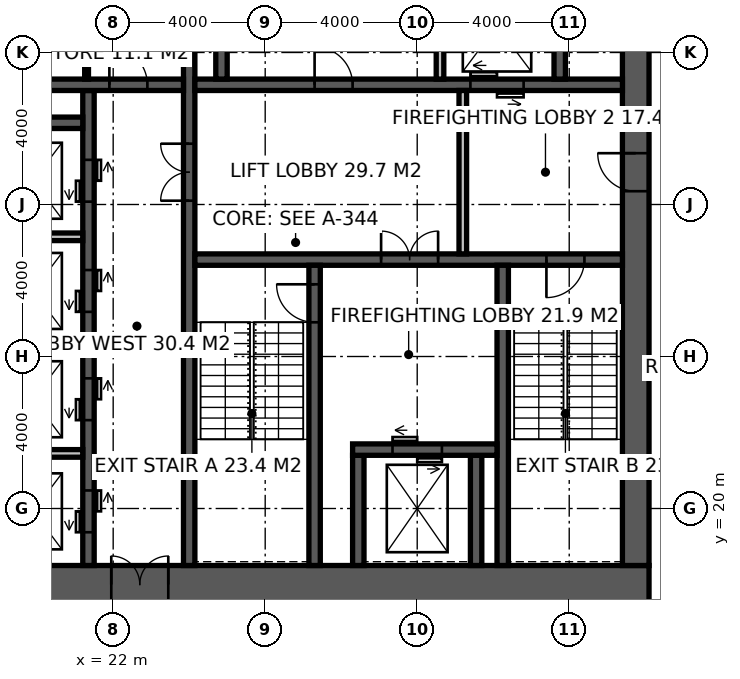
"""IFC4 building model, lengths in metres.
Left out: names, types, materials, properties, quantities, classifications, styles, units other than length and angle.
Written with IfcOpenShell. Run it as: python <this file> out.ifc"""

import sys

from ifc_helpers import new_model, si_unit, direction, frame, frame_2d, origin, place, context, subcontext, project, spatial, rectangle, extrude, element, fill, save


model = new_model("IFC4")
c1 = context("Model", 3, precision=1e-05, world=origin(), true_north=direction((0.0, 1.0)))
c2 = subcontext(c1, "Body", "Model", "MODEL_VIEW")
j1 = project(units=[si_unit("LENGTHUNIT", "METRE"), si_unit("PLANEANGLEUNIT", "RADIAN")], contexts=[c1])
p1 = place(None, origin())
s1 = spatial("IfcSite", under=j1, at=p1, CompositionType="ELEMENT")
p2 = place(p1, origin())
s2 = spatial("IfcBuilding", under=s1, at=p2, CompositionType="ELEMENT")
p3 = place(p2, frame((0.0, 0.0, 286.2)))
s3 = spatial("IfcBuildingStorey", under=s2, at=p3, CompositionType="ELEMENT", Elevation=286.2)
p4 = place(p3, frame((18.5, 18.0, -0.15), z_axis=(0.0, 0.0, 1.0), x_axis=(1.0, 0.0, 0.0)))
e1 = element("IfcWall", 1, at=p4, inside=s3, PredefinedType="SHEAR", context=c2, shape_type="SweptSolid", body=[
    extrude(rectangle(XDim=17.6, YDim=1.0, at=frame_2d((8.8, 0.0))), origin(), (0.0, 0.0, 1.0), 4.0),
])
p5 = place(p4, frame((3.45, 0.0, 0.15)))
e2 = element("IfcOpeningElement", 2, at=p5, cuts=e1, PredefinedType="OPENING", context=c2, shape_type="SweptSolid", body=[
    extrude(rectangle(XDim=1.5, YDim=2.4, at=frame_2d((0.75, 1.2))), frame((0.0, 0.51, 0.0), z_axis=(0.0, -1.0, 0.0), x_axis=(1.0, 0.0, 0.0)), (0.0, 0.0, 1.0), 1.02),
])
p6 = place(p3, frame((35.75, 18.5, -0.15), z_axis=(0.0, 0.0, 1.0), x_axis=(0.0, 1.0, 0.0)))
e3 = element("IfcWall", 3, at=p6, inside=s3, PredefinedType="SHEAR", context=c2, shape_type="SweptSolid", body=[
    extrude(rectangle(XDim=17.0, YDim=0.7, at=frame_2d((8.5, 0.0))), origin(), (0.0, 0.0, 1.0), 4.0),
])
p7 = place(p6, frame((9.85, 0.0, 0.15)))
e4 = element("IfcOpeningElement", 4, at=p7, cuts=e3, PredefinedType="OPENING", context=c2, shape_type="SweptSolid", body=[
    extrude(rectangle(XDim=1.0, YDim=2.2, at=frame_2d((0.5, 1.1))), frame((0.0, 0.36, 0.0), z_axis=(0.0, -1.0, 0.0), x_axis=(1.0, 0.0, 0.0)), (0.0, 0.0, 1.0), 0.72),
])
p8 = place(p3, frame((24.0, 18.5, -0.15), z_axis=(0.0, 0.0, 1.0), x_axis=(0.0, 1.0, 0.0)))
e5 = element("IfcWall", 5, at=p8, inside=s3, PredefinedType="SHEAR", context=c2, shape_type="SweptSolid", body=[
    extrude(rectangle(XDim=17.0, YDim=0.3, at=frame_2d((8.5, 0.0))), origin(), (0.0, 0.0, 1.0), 4.0),
])
p9 = place(p8, frame((9.6, 0.0, 0.15)))
e6 = element("IfcOpeningElement", 6, at=p9, cuts=e5, PredefinedType="OPENING", context=c2, shape_type="SweptSolid", body=[
    extrude(rectangle(XDim=1.5, YDim=2.4, at=frame_2d((0.75, 1.2))), frame((0.0, 0.16, 0.0), z_axis=(0.0, -1.0, 0.0), x_axis=(1.0, 0.0, 0.0)), (0.0, 0.0, 1.0), 0.32),
])
p10 = place(p3, frame((24.15, 26.55, -0.15), z_axis=(0.0, 0.0, 1.0), x_axis=(1.0, 0.0, 0.0)))
e7 = element("IfcWall", 7, at=p10, inside=s3, PredefinedType="SHEAR", context=c2, shape_type="SweptSolid", body=[
    extrude(rectangle(XDim=11.25, YDim=0.3, at=frame_2d((5.625, 0.0))), origin(), (0.0, 0.0, 1.0), 4.0),
])
p11 = place(p10, frame((9.25, 0.0, 0.15)))
e8 = element("IfcOpeningElement", 8, at=p11, cuts=e7, PredefinedType="OPENING", context=c2, shape_type="SweptSolid", body=[
    extrude(rectangle(XDim=1.0, YDim=2.2, at=frame_2d((0.5, 1.1))), frame((0.0, 0.16, 0.0), z_axis=(0.0, -1.0, 0.0), x_axis=(1.0, 0.0, 0.0)), (0.0, 0.0, 1.0), 0.32),
])
p12 = place(p10, frame((4.9, 0.0, 0.15)))
e9 = element("IfcOpeningElement", 9, at=p12, cuts=e7, PredefinedType="OPENING", context=c2, shape_type="SweptSolid", body=[
    extrude(rectangle(XDim=1.5, YDim=2.4, at=frame_2d((0.75, 1.2))), frame((0.0, 0.16, 0.0), z_axis=(0.0, -1.0, 0.0), x_axis=(1.0, 0.0, 0.0)), (0.0, 0.0, 1.0), 0.32),
])
p13 = place(p3, frame((27.3, 18.5, -0.15), z_axis=(0.0, 0.0, 1.0), x_axis=(0.0, 1.0, 0.0)))
e10 = element("IfcWall", 10, at=p13, inside=s3, PredefinedType="SHEAR", context=c2, shape_type="SweptSolid", body=[
    extrude(rectangle(XDim=7.9, YDim=0.3, at=frame_2d((3.95, 0.0))), origin(), (0.0, 0.0, 1.0), 4.0),
])
p14 = place(p13, frame((6.4, 0.0, 0.15)))
e11 = element("IfcOpeningElement", 11, at=p14, cuts=e10, PredefinedType="OPENING", context=c2, shape_type="SweptSolid", body=[
    extrude(rectangle(XDim=1.0, YDim=2.2, at=frame_2d((0.5, 1.1))), frame((0.0, 0.16, 0.0), z_axis=(0.0, -1.0, 0.0), x_axis=(1.0, 0.0, 0.0)), (0.0, 0.0, 1.0), 0.32),
])
p15 = place(p3, frame((32.25, 18.5, -0.15), z_axis=(0.0, 0.0, 1.0), x_axis=(0.0, 1.0, 0.0)))
e12 = element("IfcWall", 12, at=p15, inside=s3, PredefinedType="SHEAR", context=c2, shape_type="SweptSolid", body=[
    extrude(rectangle(XDim=7.9, YDim=0.3, at=frame_2d((3.95, 0.0))), origin(), (0.0, 0.0, 1.0), 4.0),
])
for number, where, z_axis, x_axis in (
    (13, (28.45, 18.5, -0.15), (0.0, 0.0, 1.0), (0.0, 1.0, 0.0)),
    (14, (31.55, 18.5, -0.15), (0.0, 0.0, 1.0), (0.0, 1.0, 0.0)),
):
    element("IfcWall", number, at=place(p3, frame(where, z_axis=z_axis, x_axis=x_axis)), inside=s3, PredefinedType="SHEAR", context=c2, shape_type="SweptSolid", body=[
        extrude(rectangle(XDim=2.9, YDim=0.3, at=frame_2d((1.45, 0.0))), origin(), (0.0, 0.0, 1.0), 4.0),
    ])
p16 = place(p3, frame((28.3, 21.55, -0.15), z_axis=(0.0, 0.0, 1.0), x_axis=(1.0, 0.0, 0.0)))
e15 = element("IfcWall", 15, at=p16, inside=s3, PredefinedType="SHEAR", context=c2, shape_type="SweptSolid", body=[
    extrude(rectangle(XDim=3.8, YDim=0.3, at=frame_2d((1.9, 0.0))), origin(), (0.0, 0.0, 1.0), 4.0),
])
p17 = place(p16, frame((1.05, 0.0, 0.15)))
e16 = element("IfcOpeningElement", 16, at=p17, cuts=e15, PredefinedType="OPENING", context=c2, shape_type="SweptSolid", body=[
    extrude(rectangle(XDim=1.3, YDim=2.4, at=frame_2d((0.65, 1.2))), frame((0.0, 0.16, 0.0), z_axis=(0.0, -1.0, 0.0), x_axis=(1.0, 0.0, 0.0)), (0.0, 0.0, 1.0), 0.32),
])
p18 = place(p3, frame((24.15, 31.15, -0.15), z_axis=(0.0, 0.0, 1.0), x_axis=(1.0, 0.0, 0.0)))
e17 = element("IfcWall", 17, at=p18, inside=s3, PredefinedType="SHEAR", context=c2, shape_type="SweptSolid", body=[
    extrude(rectangle(XDim=11.25, YDim=0.3, at=frame_2d((5.625, 0.0))), origin(), (0.0, 0.0, 1.0), 4.0),
])
p19 = place(p18, frame((3.15, 0.0, 0.15)))
e18 = element("IfcOpeningElement", 18, at=p19, cuts=e17, PredefinedType="OPENING", context=c2, shape_type="SweptSolid", body=[
    extrude(rectangle(XDim=1.0, YDim=2.2, at=frame_2d((0.5, 1.1))), frame((0.0, 0.16, 0.0), z_axis=(0.0, -1.0, 0.0), x_axis=(1.0, 0.0, 0.0)), (0.0, 0.0, 1.0), 0.32),
])
p20 = place(p18, frame((7.25, 0.0, 0.15)))
e19 = element("IfcOpeningElement", 19, at=p20, cuts=e17, PredefinedType="OPENING", context=c2, shape_type="SweptSolid", body=[
    extrude(rectangle(XDim=1.4, YDim=2.4, at=frame_2d((0.7, 1.2))), frame((0.0, 0.16, 0.0), z_axis=(0.0, -1.0, 0.0), x_axis=(1.0, 0.0, 0.0)), (0.0, 0.0, 1.0), 0.32),
])
p21 = place(p3, frame((21.35, 18.5, -0.15), z_axis=(0.0, 0.0, 1.0), x_axis=(0.0, 1.0, 0.0)))
e20 = element("IfcWall", 20, at=p21, inside=s3, PredefinedType="SHEAR", context=c2, shape_type="SweptSolid", body=[
    extrude(rectangle(XDim=12.5, YDim=0.3, at=frame_2d((6.25, 0.0))), origin(), (0.0, 0.0, 1.0), 4.0),
])
p22 = place(p21, frame((0.875, 0.0, 0.15)))
e21 = element("IfcOpeningElement", 21, at=p22, cuts=e20, PredefinedType="OPENING", context=c2, shape_type="SweptSolid", body=[
    extrude(rectangle(XDim=1.1, YDim=2.2, at=frame_2d((0.55, 1.1))), frame((0.0, 0.16, 0.0), z_axis=(0.0, -1.0, 0.0), x_axis=(1.0, 0.0, 0.0)), (0.0, 0.0, 1.0), 0.32),
])
p23 = place(p21, frame((3.825, 0.0, 0.15)))
e22 = element("IfcOpeningElement", 22, at=p23, cuts=e20, PredefinedType="OPENING", context=c2, shape_type="SweptSolid", body=[
    extrude(rectangle(XDim=1.1, YDim=2.2, at=frame_2d((0.55, 1.1))), frame((0.0, 0.16, 0.0), z_axis=(0.0, -1.0, 0.0), x_axis=(1.0, 0.0, 0.0)), (0.0, 0.0, 1.0), 0.32),
])
p24 = place(p21, frame((6.675, 0.0, 0.15)))
e23 = element("IfcOpeningElement", 23, at=p24, cuts=e20, PredefinedType="OPENING", context=c2, shape_type="SweptSolid", body=[
    extrude(rectangle(XDim=1.1, YDim=2.2, at=frame_2d((0.55, 1.1))), frame((0.0, 0.16, 0.0), z_axis=(0.0, -1.0, 0.0), x_axis=(1.0, 0.0, 0.0)), (0.0, 0.0, 1.0), 0.32),
])
p25 = place(p21, frame((9.575, 0.0, 0.15)))
e24 = element("IfcOpeningElement", 24, at=p25, cuts=e20, PredefinedType="OPENING", context=c2, shape_type="SweptSolid", body=[
    extrude(rectangle(XDim=1.1, YDim=2.2, at=frame_2d((0.55, 1.1))), frame((0.0, 0.16, 0.0), z_axis=(0.0, -1.0, 0.0), x_axis=(1.0, 0.0, 0.0)), (0.0, 0.0, 1.0), 0.32),
])
p26 = place(p3, frame((18.5, 31.15, -0.15), z_axis=(0.0, 0.0, 1.0), x_axis=(1.0, 0.0, 0.0)))
e25 = element("IfcWall", 25, at=p26, inside=s3, PredefinedType="SHEAR", context=c2, shape_type="SweptSolid", body=[
    extrude(rectangle(XDim=5.35, YDim=0.3, at=frame_2d((2.675, 0.0))), origin(), (0.0, 0.0, 1.0), 4.0),
])
p27 = place(p26, frame((3.4, 0.0, 0.15)))
e26 = element("IfcOpeningElement", 26, at=p27, cuts=e25, PredefinedType="OPENING", context=c2, shape_type="SweptSolid", body=[
    extrude(rectangle(XDim=1.0, YDim=2.2, at=frame_2d((0.5, 1.1))), frame((0.0, 0.16, 0.0), z_axis=(0.0, -1.0, 0.0), x_axis=(1.0, 0.0, 0.0)), (0.0, 0.0, 1.0), 0.32),
])
p28 = place(p3, frame((18.5, 30.15, -0.15), z_axis=(0.0, 0.0, 1.0), x_axis=(1.0, 0.0, 0.0)))
e27 = element("IfcWall", 27, at=p28, inside=s3, PredefinedType="SHEAR", context=c2, shape_type="SweptSolid", body=[
    extrude(rectangle(XDim=2.7, YDim=0.3, at=frame_2d((1.35, 0.0))), origin(), (0.0, 0.0, 1.0), 4.0),
])
for number, where, z_axis, x_axis in (
    (28, (24.85, 31.3, -0.15), (0.0, 0.0, 1.0), (0.0, 1.0, 0.0)),
    (29, (33.75, 31.3, -0.15), (0.0, 0.0, 1.0), (0.0, 1.0, 0.0)),
):
    element("IfcWall", number, at=place(p3, frame(where, z_axis=z_axis, x_axis=x_axis)), inside=s3, PredefinedType="SHEAR", context=c2, shape_type="SweptSolid", body=[
        extrude(rectangle(XDim=4.2, YDim=0.3, at=frame_2d((2.1, 0.0))), origin(), (0.0, 0.0, 1.0), 4.0),
    ])
p29 = place(p3, frame((30.6, 31.3, -0.15), z_axis=(0.0, 0.0, 1.0), x_axis=(0.0, 1.0, 0.0)))
e30 = element("IfcWall", 30, at=p29, inside=s3, PredefinedType="SOLIDWALL", context=c2, shape_type="SweptSolid", body=[
    extrude(rectangle(XDim=2.8, YDim=0.2, at=frame_2d((1.4, 0.0))), origin(), (0.0, 0.0, 1.0), 4.0),
])
for number, where, z_axis, x_axis in (
    (31, (18.5, 21.45, -0.15), (0.0, 0.0, 1.0), (1.0, 0.0, 0.0)),
    (32, (18.5, 24.3, -0.15), (0.0, 0.0, 1.0), (1.0, 0.0, 0.0)),
    (33, (18.5, 27.15, -0.15), (0.0, 0.0, 1.0), (1.0, 0.0, 0.0)),
):
    element("IfcWall", number, at=place(p3, frame(where, z_axis=z_axis, x_axis=x_axis)), inside=s3, PredefinedType="SOLIDWALL", context=c2, shape_type="SweptSolid", body=[
        extrude(rectangle(XDim=2.7, YDim=0.2, at=frame_2d((1.35, 0.0))), origin(), (0.0, 0.0, 1.0), 4.0),
    ])
p30 = place(p3, frame((31.2, 26.7, 0.0), z_axis=(0.0, 0.0, 1.0), x_axis=(0.0, 1.0, 0.0)))
e34 = element("IfcWall", 34, at=p30, inside=s3, PredefinedType="SOLIDWALL", context=c2, shape_type="SweptSolid", body=[
    extrude(rectangle(XDim=4.3, YDim=0.2, at=frame_2d((2.15, 0.0))), origin(), (0.0, 0.0, 1.0), 3.85),
])
p31 = place(p3, frame((21.3, 31.3, 0.0), z_axis=(0.0, 0.0, 1.0), x_axis=(0.0, 1.0, 0.0)))
e35 = element("IfcWall", 35, at=p31, inside=s3, PredefinedType="PARTITIONING", context=c2, shape_type="SweptSolid", body=[
    extrude(rectangle(XDim=4.2, YDim=0.1, at=frame_2d((2.1, 0.0))), origin(), (0.0, 0.0, 1.0), 3.85),
])
p32 = place(p31, frame((1.55, 0.0, 0.0)))
e36 = element("IfcOpeningElement", 36, at=p32, cuts=e35, PredefinedType="OPENING", context=c2, shape_type="SweptSolid", body=[
    extrude(rectangle(XDim=1.0, YDim=2.2, at=frame_2d((0.5, 1.1))), frame((0.0, 0.06, 0.0), z_axis=(0.0, -1.0, 0.0), x_axis=(1.0, 0.0, 0.0)), (0.0, 0.0, 1.0), 0.12),
])
p33 = place(p14, origin())
e37 = element("IfcDoor", 37, at=p33, inside=s3, OperationType="SINGLE_SWING_RIGHT", PredefinedType="DOOR", context=c2, shape_type="SweptSolid", body=[
    extrude(rectangle(XDim=1.0, YDim=2.2, at=frame_2d((0.5, 1.1))), frame((0.0, 0.025, 0.0), z_axis=(0.0, -1.0, 0.0), x_axis=(1.0, 0.0, 0.0)), (0.0, 0.0, 1.0), 0.05),
])
fill(e11, e37)
p34 = place(p11, frame((1.0, 0.0, 0.0), z_axis=(0.0, 0.0, 1.0), x_axis=(-1.0, 0.0, 0.0)))
e38 = element("IfcDoor", 38, at=p34, inside=s3, OperationType="SINGLE_SWING_RIGHT", PredefinedType="DOOR", context=c2, shape_type="SweptSolid", body=[
    extrude(rectangle(XDim=1.0, YDim=2.2, at=frame_2d((0.5, 1.1))), frame((0.0, 0.025, 0.0), z_axis=(0.0, -1.0, 0.0), x_axis=(1.0, 0.0, 0.0)), (0.0, 0.0, 1.0), 0.05),
])
fill(e8, e38)
p35 = place(p7, origin())
e39 = element("IfcDoor", 39, at=p35, inside=s3, OperationType="SINGLE_SWING_RIGHT", PredefinedType="DOOR", context=c2, shape_type="SweptSolid", body=[
    extrude(rectangle(XDim=1.0, YDim=2.2, at=frame_2d((0.5, 1.1))), frame((0.0, 0.025, 0.0), z_axis=(0.0, -1.0, 0.0), x_axis=(1.0, 0.0, 0.0)), (0.0, 0.0, 1.0), 0.05),
])
fill(e4, e39)
p36 = place(p12, origin())
e40 = element("IfcDoor", 40, at=p36, inside=s3, OperationType="DOUBLE_DOOR_DOUBLE_SWING", PredefinedType="DOOR", context=c2, shape_type="SweptSolid", body=[
    extrude(rectangle(XDim=1.5, YDim=2.4, at=frame_2d((0.75, 1.2))), frame((0.0, 0.025, 0.0), z_axis=(0.0, -1.0, 0.0), x_axis=(1.0, 0.0, 0.0)), (0.0, 0.0, 1.0), 0.05),
])
fill(e9, e40)
p37 = place(p9, origin())
e41 = element("IfcDoor", 41, at=p37, inside=s3, OperationType="DOUBLE_DOOR_DOUBLE_SWING", PredefinedType="DOOR", context=c2, shape_type="SweptSolid", body=[
    extrude(rectangle(XDim=1.5, YDim=2.4, at=frame_2d((0.75, 1.2))), frame((0.0, 0.025, 0.0), z_axis=(0.0, -1.0, 0.0), x_axis=(1.0, 0.0, 0.0)), (0.0, 0.0, 1.0), 0.05),
])
fill(e6, e41)
p38 = place(p27, origin())
e42 = element("IfcDoor", 42, at=p38, inside=s3, OperationType="SINGLE_SWING_LEFT", PredefinedType="DOOR", context=c2, shape_type="SweptSolid", body=[
    extrude(rectangle(XDim=1.0, YDim=2.2, at=frame_2d((0.5, 1.1))), frame((0.0, 0.025, 0.0), z_axis=(0.0, -1.0, 0.0), x_axis=(1.0, 0.0, 0.0)), (0.0, 0.0, 1.0), 0.05),
])
fill(e26, e42)
p39 = place(p19, origin())
e43 = element("IfcDoor", 43, at=p39, inside=s3, OperationType="SINGLE_SWING_LEFT", PredefinedType="DOOR", context=c2, shape_type="SweptSolid", body=[
    extrude(rectangle(XDim=1.0, YDim=2.2, at=frame_2d((0.5, 1.1))), frame((0.0, 0.025, 0.0), z_axis=(0.0, -1.0, 0.0), x_axis=(1.0, 0.0, 0.0)), (0.0, 0.0, 1.0), 0.05),
])
fill(e18, e43)
p40 = place(p5, origin())
e44 = element("IfcDoor", 44, at=p40, inside=s3, OperationType="DOUBLE_DOOR_DOUBLE_SWING", PredefinedType="DOOR", context=c2, shape_type="SweptSolid", body=[
    extrude(rectangle(XDim=1.5, YDim=2.4, at=frame_2d((0.75, 1.2))), frame((0.0, 0.025, 0.0), z_axis=(0.0, -1.0, 0.0), x_axis=(1.0, 0.0, 0.0)), (0.0, 0.0, 1.0), 0.05),
])
fill(e2, e44)
p41 = place(p17, origin())
e45 = element("IfcDoor", 45, at=p41, inside=s3, OperationType="DOUBLE_DOOR_SLIDING", PredefinedType="DOOR", context=c2, shape_type="SweptSolid", body=[
    extrude(rectangle(XDim=1.3, YDim=2.4, at=frame_2d((0.65, 1.2))), frame((0.0, 0.025, 0.0), z_axis=(0.0, -1.0, 0.0), x_axis=(1.0, 0.0, 0.0)), (0.0, 0.0, 1.0), 0.05),
])
fill(e16, e45)
p42 = place(p20, origin())
e46 = element("IfcDoor", 46, at=p42, inside=s3, OperationType="DOUBLE_DOOR_SLIDING", PredefinedType="DOOR", context=c2, shape_type="SweptSolid", body=[
    extrude(rectangle(XDim=1.4, YDim=2.4, at=frame_2d((0.7, 1.2))), frame((0.0, 0.025, 0.0), z_axis=(0.0, -1.0, 0.0), x_axis=(1.0, 0.0, 0.0)), (0.0, 0.0, 1.0), 0.05),
])
fill(e19, e46)
p43 = place(p22, origin())
e47 = element("IfcDoor", 47, at=p43, inside=s3, OperationType="DOUBLE_DOOR_SLIDING", PredefinedType="DOOR", context=c2, shape_type="SweptSolid", body=[
    extrude(rectangle(XDim=1.1, YDim=2.2, at=frame_2d((0.55, 1.1))), frame((0.0, 0.025, 0.0), z_axis=(0.0, -1.0, 0.0), x_axis=(1.0, 0.0, 0.0)), (0.0, 0.0, 1.0), 0.05),
])
fill(e21, e47)
p44 = place(p23, origin())
e48 = element("IfcDoor", 48, at=p44, inside=s3, OperationType="DOUBLE_DOOR_SLIDING", PredefinedType="DOOR", context=c2, shape_type="SweptSolid", body=[
    extrude(rectangle(XDim=1.1, YDim=2.2, at=frame_2d((0.55, 1.1))), frame((0.0, 0.025, 0.0), z_axis=(0.0, -1.0, 0.0), x_axis=(1.0, 0.0, 0.0)), (0.0, 0.0, 1.0), 0.05),
])
fill(e22, e48)
p45 = place(p24, origin())
e49 = element("IfcDoor", 49, at=p45, inside=s3, OperationType="DOUBLE_DOOR_SLIDING", PredefinedType="DOOR", context=c2, shape_type="SweptSolid", body=[
    extrude(rectangle(XDim=1.1, YDim=2.2, at=frame_2d((0.55, 1.1))), frame((0.0, 0.025, 0.0), z_axis=(0.0, -1.0, 0.0), x_axis=(1.0, 0.0, 0.0)), (0.0, 0.0, 1.0), 0.05),
])
fill(e23, e49)
p46 = place(p25, origin())
e50 = element("IfcDoor", 50, at=p46, inside=s3, OperationType="DOUBLE_DOOR_SLIDING", PredefinedType="DOOR", context=c2, shape_type="SweptSolid", body=[
    extrude(rectangle(XDim=1.1, YDim=2.2, at=frame_2d((0.55, 1.1))), frame((0.0, 0.025, 0.0), z_axis=(0.0, -1.0, 0.0), x_axis=(1.0, 0.0, 0.0)), (0.0, 0.0, 1.0), 0.05),
])
fill(e24, e50)
save(model, sys.argv[1])
